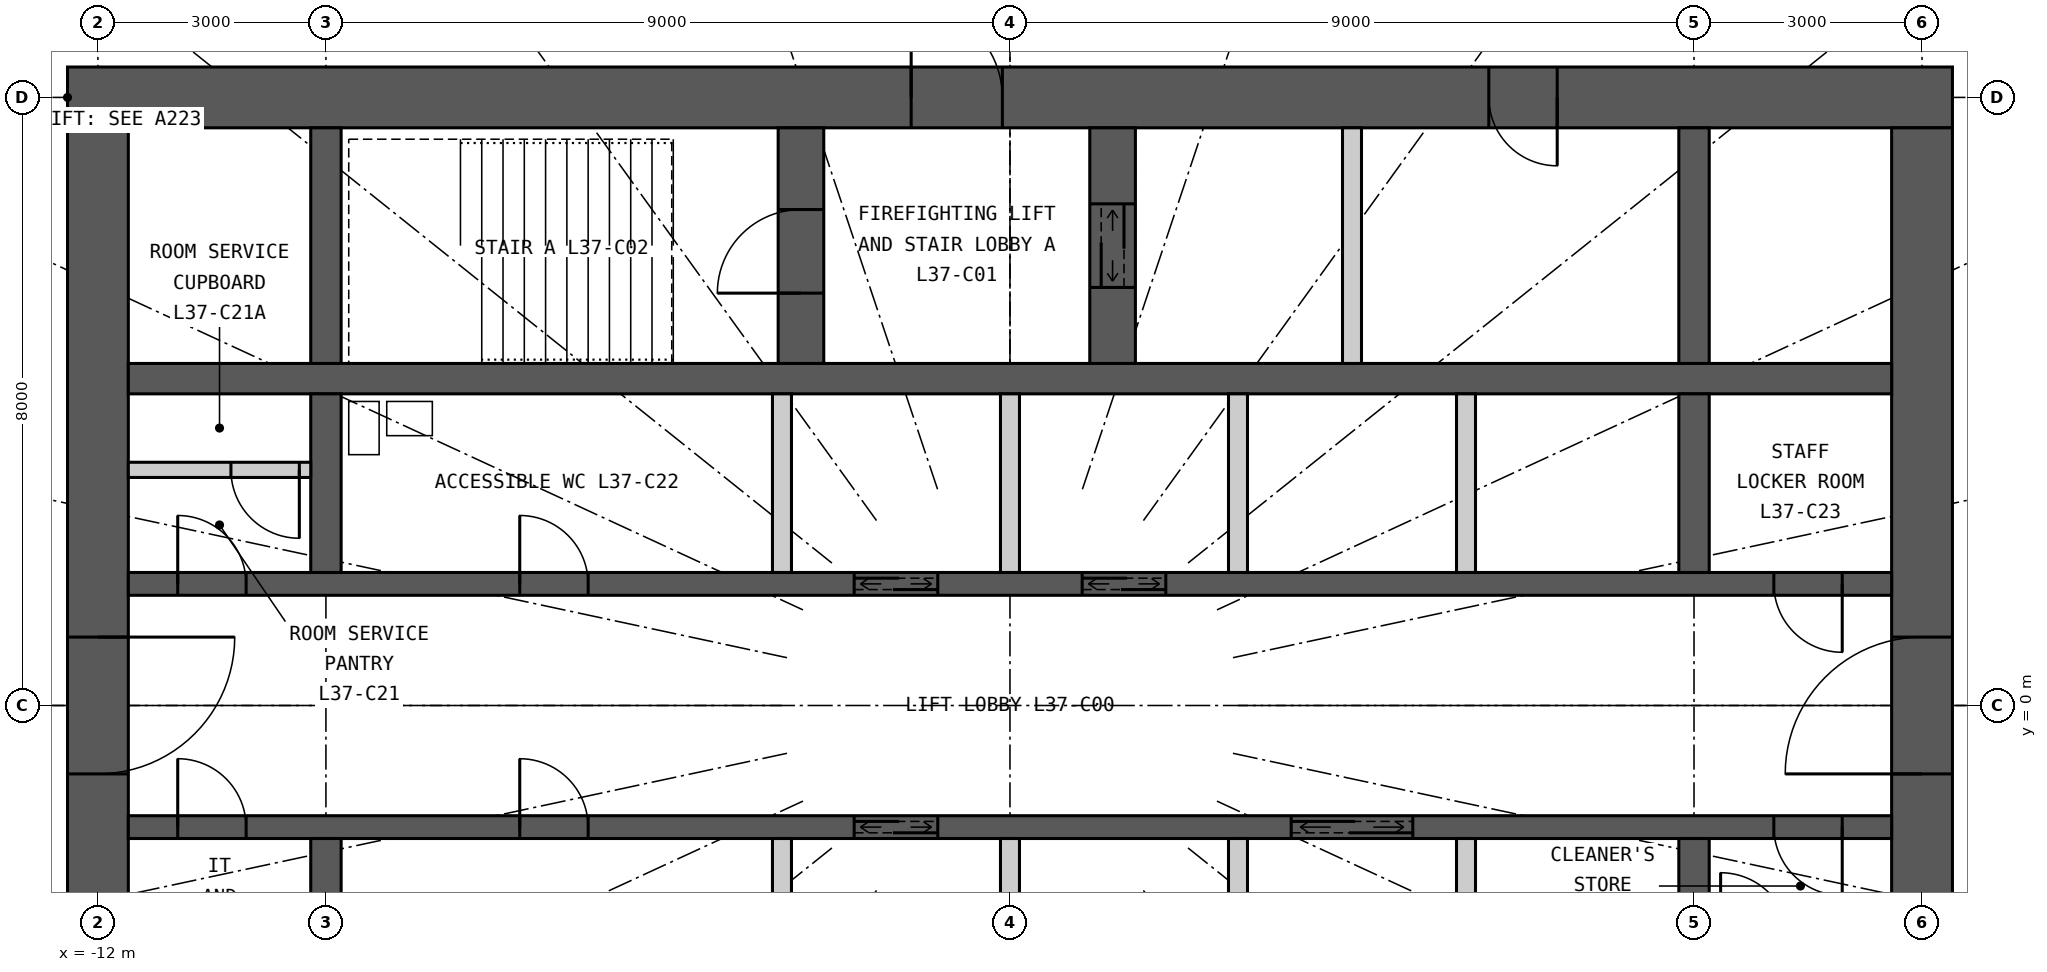
"""IFC4 building model, lengths in metres.
Left out: names, types, materials, properties, quantities, classifications, styles, units other than length and angle.
Written with IfcOpenShell. Run it as: python <this file> out.ifc"""

import sys

from ifc_helpers import new_model, si_unit, direction, frame, frame_2d, origin, place, context, subcontext, project, spatial, rectangle, extrude, element, fill, save


model = new_model("IFC4")
c1 = context("Model", 3, precision=1e-05, world=origin(), true_north=direction((0.0, 1.0)))
c2 = subcontext(c1, "Body", "Model", "MODEL_VIEW")
j1 = project(units=[si_unit("LENGTHUNIT", "METRE"), si_unit("PLANEANGLEUNIT", "RADIAN")], contexts=[c1])
p1 = place(None, origin())
s1 = spatial("IfcSite", under=j1, at=p1, CompositionType="ELEMENT")
p2 = place(p1, origin())
s2 = spatial("IfcBuilding", under=s1, at=p2, CompositionType="ELEMENT")
p3 = place(p2, frame((0.0, 0.0, 143.4)))
s3 = spatial("IfcBuildingStorey", under=s2, at=p3, CompositionType="ELEMENT", Elevation=143.4)
p4 = place(p3, frame((-12.4, 8.0, 0.0), z_axis=(0.0, 0.0, 1.0), x_axis=(1.0, 0.0, 0.0)))
e1 = element("IfcWall", 1, at=p4, inside=s3, PredefinedType="SHEAR", context=c2, shape_type="SweptSolid", body=[
    extrude(rectangle(XDim=24.8, YDim=0.8, at=frame_2d((12.4, 0.0))), origin(), (0.0, 0.0, 1.0), 3.3),
])
p5 = place(p4, frame((11.1, 0.0, 0.0)))
e2 = element("IfcOpeningElement", 2, at=p5, cuts=e1, PredefinedType="OPENING", context=c2, shape_type="SweptSolid", body=[
    extrude(rectangle(XDim=1.2, YDim=2.2, at=frame_2d((0.6, 1.1))), frame((0.0, 0.41, 0.0), z_axis=(0.0, -1.0, 0.0), x_axis=(1.0, 0.0, 0.0)), (0.0, 0.0, 1.0), 0.82),
])
p6 = place(p4, frame((18.7, 0.0, 0.0)))
e3 = element("IfcOpeningElement", 3, at=p6, cuts=e1, PredefinedType="OPENING", context=c2, shape_type="SweptSolid", body=[
    extrude(rectangle(XDim=0.9, YDim=2.2, at=frame_2d((0.45, 1.1))), frame((0.0, 0.41, 0.0), z_axis=(0.0, -1.0, 0.0), x_axis=(1.0, 0.0, 0.0)), (0.0, 0.0, 1.0), 0.82),
])
p7 = place(p3, frame((12.0, -7.6, 0.0), z_axis=(0.0, 0.0, 1.0), x_axis=(0.0, 1.0, 0.0)))
e4 = element("IfcWall", 4, at=p7, inside=s3, PredefinedType="SHEAR", context=c2, shape_type="SweptSolid", body=[
    extrude(rectangle(XDim=15.2, YDim=0.8, at=frame_2d((7.6, 0.0))), origin(), (0.0, 0.0, 1.0), 3.3),
])
p8 = place(p7, frame((6.7, 0.0, 0.0)))
e5 = element("IfcOpeningElement", 5, at=p8, cuts=e4, PredefinedType="OPENING", context=c2, shape_type="SweptSolid", body=[
    extrude(rectangle(XDim=1.8, YDim=2.2, at=frame_2d((0.9, 1.1))), frame((0.0, 0.41, 0.0), z_axis=(0.0, -1.0, 0.0), x_axis=(1.0, 0.0, 0.0)), (0.0, 0.0, 1.0), 0.82),
])
p9 = place(p3, frame((-12.0, 7.6, 0.0), z_axis=(0.0, 0.0, 1.0), x_axis=(0.0, -1.0, 0.0)))
e6 = element("IfcWall", 6, at=p9, inside=s3, PredefinedType="SHEAR", context=c2, shape_type="SweptSolid", body=[
    extrude(rectangle(XDim=15.2, YDim=0.8, at=frame_2d((7.6, 0.0))), origin(), (0.0, 0.0, 1.0), 3.3),
])
p10 = place(p9, frame((6.7, 0.0, 0.0)))
e7 = element("IfcOpeningElement", 7, at=p10, cuts=e6, PredefinedType="OPENING", context=c2, shape_type="SweptSolid", body=[
    extrude(rectangle(XDim=1.8, YDim=2.2, at=frame_2d((0.9, 1.1))), frame((0.0, 0.41, 0.0), z_axis=(0.0, -1.0, 0.0), x_axis=(1.0, 0.0, 0.0)), (0.0, 0.0, 1.0), 0.82),
])
p11 = place(p3, frame((-11.6, 4.3, 0.0), z_axis=(0.0, 0.0, 1.0), x_axis=(1.0, 0.0, 0.0)))
e8 = element("IfcWall", 8, at=p11, inside=s3, PredefinedType="SHEAR", context=c2, shape_type="SweptSolid", body=[
    extrude(rectangle(XDim=23.2, YDim=0.4, at=frame_2d((11.6, 0.0))), origin(), (0.0, 0.0, 1.0), 3.3),
])
p12 = place(p3, frame((-11.6, 1.6, 0.0), z_axis=(0.0, 0.0, 1.0), x_axis=(1.0, 0.0, 0.0)))
e9 = element("IfcWall", 9, at=p12, inside=s3, PredefinedType="SHEAR", context=c2, shape_type="SweptSolid", body=[
    extrude(rectangle(XDim=23.2, YDim=0.3, at=frame_2d((11.6, 0.0))), origin(), (0.0, 0.0, 1.0), 3.3),
])
p13 = place(p12, frame((9.55, 0.0, 0.0)))
e10 = element("IfcOpeningElement", 10, at=p13, cuts=e9, PredefinedType="OPENING", context=c2, shape_type="SweptSolid", body=[
    extrude(rectangle(XDim=1.1, YDim=2.2, at=frame_2d((0.55, 1.1))), frame((0.0, 0.16, 0.0), z_axis=(0.0, -1.0, 0.0), x_axis=(1.0, 0.0, 0.0)), (0.0, 0.0, 1.0), 0.32),
])
p14 = place(p12, frame((12.55, 0.0, 0.0)))
e11 = element("IfcOpeningElement", 11, at=p14, cuts=e9, PredefinedType="OPENING", context=c2, shape_type="SweptSolid", body=[
    extrude(rectangle(XDim=1.1, YDim=2.2, at=frame_2d((0.55, 1.1))), frame((0.0, 0.16, 0.0), z_axis=(0.0, -1.0, 0.0), x_axis=(1.0, 0.0, 0.0)), (0.0, 0.0, 1.0), 0.32),
])
p15 = place(p12, frame((0.65, 0.0, 0.0)))
e12 = element("IfcOpeningElement", 12, at=p15, cuts=e9, PredefinedType="OPENING", context=c2, shape_type="SweptSolid", body=[
    extrude(rectangle(XDim=0.9, YDim=2.2, at=frame_2d((0.45, 1.1))), frame((0.0, 0.16, 0.0), z_axis=(0.0, -1.0, 0.0), x_axis=(1.0, 0.0, 0.0)), (0.0, 0.0, 1.0), 0.32),
])
p16 = place(p12, frame((5.15, 0.0, 0.0)))
e13 = element("IfcOpeningElement", 13, at=p16, cuts=e9, PredefinedType="OPENING", context=c2, shape_type="SweptSolid", body=[
    extrude(rectangle(XDim=0.9, YDim=2.2, at=frame_2d((0.45, 1.1))), frame((0.0, 0.16, 0.0), z_axis=(0.0, -1.0, 0.0), x_axis=(1.0, 0.0, 0.0)), (0.0, 0.0, 1.0), 0.32),
])
p17 = place(p12, frame((21.65, 0.0, 0.0)))
e14 = element("IfcOpeningElement", 14, at=p17, cuts=e9, PredefinedType="OPENING", context=c2, shape_type="SweptSolid", body=[
    extrude(rectangle(XDim=0.9, YDim=2.2, at=frame_2d((0.45, 1.1))), frame((0.0, 0.16, 0.0), z_axis=(0.0, -1.0, 0.0), x_axis=(1.0, 0.0, 0.0)), (0.0, 0.0, 1.0), 0.32),
])
p18 = place(p3, frame((-11.6, -1.6, 0.0), z_axis=(0.0, 0.0, 1.0), x_axis=(1.0, 0.0, 0.0)))
e15 = element("IfcWall", 15, at=p18, inside=s3, PredefinedType="SHEAR", context=c2, shape_type="SweptSolid", body=[
    extrude(rectangle(XDim=23.2, YDim=0.3, at=frame_2d((11.6, 0.0))), origin(), (0.0, 0.0, 1.0), 3.3),
])
p19 = place(p18, frame((9.55, 0.0, 0.0)))
e16 = element("IfcOpeningElement", 16, at=p19, cuts=e15, PredefinedType="OPENING", context=c2, shape_type="SweptSolid", body=[
    extrude(rectangle(XDim=1.1, YDim=2.2, at=frame_2d((0.55, 1.1))), frame((0.0, 0.16, 0.0), z_axis=(0.0, -1.0, 0.0), x_axis=(1.0, 0.0, 0.0)), (0.0, 0.0, 1.0), 0.32),
])
p20 = place(p18, frame((15.3, 0.0, 0.0)))
e17 = element("IfcOpeningElement", 17, at=p20, cuts=e15, PredefinedType="OPENING", context=c2, shape_type="SweptSolid", body=[
    extrude(rectangle(XDim=1.6, YDim=2.4, at=frame_2d((0.8, 1.2))), frame((0.0, 0.16, 0.0), z_axis=(0.0, -1.0, 0.0), x_axis=(1.0, 0.0, 0.0)), (0.0, 0.0, 1.0), 0.32),
])
p21 = place(p18, frame((0.65, 0.0, 0.0)))
e18 = element("IfcOpeningElement", 18, at=p21, cuts=e15, PredefinedType="OPENING", context=c2, shape_type="SweptSolid", body=[
    extrude(rectangle(XDim=0.9, YDim=2.2, at=frame_2d((0.45, 1.1))), frame((0.0, 0.16, 0.0), z_axis=(0.0, -1.0, 0.0), x_axis=(1.0, 0.0, 0.0)), (0.0, 0.0, 1.0), 0.32),
])
p22 = place(p18, frame((5.15, 0.0, 0.0)))
e19 = element("IfcOpeningElement", 19, at=p22, cuts=e15, PredefinedType="OPENING", context=c2, shape_type="SweptSolid", body=[
    extrude(rectangle(XDim=0.9, YDim=2.2, at=frame_2d((0.45, 1.1))), frame((0.0, 0.16, 0.0), z_axis=(0.0, -1.0, 0.0), x_axis=(1.0, 0.0, 0.0)), (0.0, 0.0, 1.0), 0.32),
])
p23 = place(p18, frame((21.65, 0.0, 0.0)))
e20 = element("IfcOpeningElement", 20, at=p23, cuts=e15, PredefinedType="OPENING", context=c2, shape_type="SweptSolid", body=[
    extrude(rectangle(XDim=0.9, YDim=2.2, at=frame_2d((0.45, 1.1))), frame((0.0, 0.16, 0.0), z_axis=(0.0, -1.0, 0.0), x_axis=(1.0, 0.0, 0.0)), (0.0, 0.0, 1.0), 0.32),
])
p24 = place(p3, frame((-9.0, 4.5, 0.0), z_axis=(0.0, 0.0, 1.0), x_axis=(0.0, 1.0, 0.0)))
e21 = element("IfcWall", 21, at=p24, inside=s3, PredefinedType="SHEAR", context=c2, shape_type="SweptSolid", body=[
    extrude(rectangle(XDim=3.1, YDim=0.4, at=frame_2d((1.55, 0.0))), origin(), (0.0, 0.0, 1.0), 3.3),
])
for number, where, z_axis, x_axis in (
    (22, (-9.0, 1.75, 0.0), (0.0, 0.0, 1.0), (0.0, 1.0, 0.0)),
    (23, (-9.0, -4.1, 0.0), (0.0, 0.0, 1.0), (0.0, 1.0, 0.0)),
):
    element("IfcWall", number, at=place(p3, frame(where, z_axis=z_axis, x_axis=x_axis)), inside=s3, PredefinedType="SHEAR", context=c2, shape_type="SweptSolid", body=[
        extrude(rectangle(XDim=2.35, YDim=0.4, at=frame_2d((1.175, 0.0))), origin(), (0.0, 0.0, 1.0), 3.3),
    ])
p25 = place(p3, frame((9.0, 4.5, 0.0), z_axis=(0.0, 0.0, 1.0), x_axis=(0.0, 1.0, 0.0)))
e24 = element("IfcWall", 24, at=p25, inside=s3, PredefinedType="SHEAR", context=c2, shape_type="SweptSolid", body=[
    extrude(rectangle(XDim=3.1, YDim=0.4, at=frame_2d((1.55, 0.0))), origin(), (0.0, 0.0, 1.0), 3.3),
])
for number, where, z_axis, x_axis in (
    (25, (9.0, 1.75, 0.0), (0.0, 0.0, 1.0), (0.0, 1.0, 0.0)),
    (26, (9.0, -4.1, 0.0), (0.0, 0.0, 1.0), (0.0, 1.0, 0.0)),
):
    element("IfcWall", number, at=place(p3, frame(where, z_axis=z_axis, x_axis=x_axis)), inside=s3, PredefinedType="SHEAR", context=c2, shape_type="SweptSolid", body=[
        extrude(rectangle(XDim=2.35, YDim=0.4, at=frame_2d((1.175, 0.0))), origin(), (0.0, 0.0, 1.0), 3.3),
    ])
p26 = place(p3, frame((-2.75, 4.5, 0.0), z_axis=(0.0, 0.0, 1.0), x_axis=(0.0, 1.0, 0.0)))
e27 = element("IfcWall", 27, at=p26, inside=s3, PredefinedType="SHEAR", context=c2, shape_type="SweptSolid", body=[
    extrude(rectangle(XDim=3.1, YDim=0.6, at=frame_2d((1.55, 0.0))), origin(), (0.0, 0.0, 1.0), 3.3),
])
p27 = place(p26, frame((0.925, 0.0, 0.0)))
e28 = element("IfcOpeningElement", 28, at=p27, cuts=e27, PredefinedType="OPENING", context=c2, shape_type="SweptSolid", body=[
    extrude(rectangle(XDim=1.1, YDim=2.2, at=frame_2d((0.55, 1.1))), frame((0.0, 0.31, 0.0), z_axis=(0.0, -1.0, 0.0), x_axis=(1.0, 0.0, 0.0)), (0.0, 0.0, 1.0), 0.62),
])
p28 = place(p3, frame((1.35, 4.5, 0.0), z_axis=(0.0, 0.0, 1.0), x_axis=(0.0, 1.0, 0.0)))
e29 = element("IfcWall", 29, at=p28, inside=s3, PredefinedType="SHEAR", context=c2, shape_type="SweptSolid", body=[
    extrude(rectangle(XDim=3.1, YDim=0.6, at=frame_2d((1.55, 0.0))), origin(), (0.0, 0.0, 1.0), 3.3),
])
p29 = place(p28, frame((1.0, 0.0, 0.0)))
e30 = element("IfcOpeningElement", 30, at=p29, cuts=e29, PredefinedType="OPENING", context=c2, shape_type="SweptSolid", body=[
    extrude(rectangle(XDim=1.1, YDim=2.2, at=frame_2d((0.55, 1.1))), frame((0.0, 0.31, 0.0), z_axis=(0.0, -1.0, 0.0), x_axis=(1.0, 0.0, 0.0)), (0.0, 0.0, 1.0), 0.62),
])
p30 = place(p3, frame((4.5, 4.5, 0.0), z_axis=(0.0, 0.0, 1.0), x_axis=(0.0, 1.0, 0.0)))
e31 = element("IfcWall", 31, at=p30, inside=s3, PredefinedType="PARTITIONING", context=c2, shape_type="SweptSolid", body=[
    extrude(rectangle(XDim=3.1, YDim=0.25, at=frame_2d((1.55, 0.0))), origin(), (0.0, 0.0, 1.0), 3.3),
])
for number, where, z_axis, x_axis in (
    (32, (-3.0, 1.75, 0.0), (0.0, 0.0, 1.0), (0.0, 1.0, 0.0)),
    (33, (0.0, 1.75, 0.0), (0.0, 0.0, 1.0), (0.0, 1.0, 0.0)),
    (34, (3.0, 1.75, 0.0), (0.0, 0.0, 1.0), (0.0, 1.0, 0.0)),
    (35, (6.0, 1.75, 0.0), (0.0, 0.0, 1.0), (0.0, 1.0, 0.0)),
    (36, (-3.0, -4.1, 0.0), (0.0, 0.0, 1.0), (0.0, 1.0, 0.0)),
    (37, (0.0, -4.1, 0.0), (0.0, 0.0, 1.0), (0.0, 1.0, 0.0)),
    (38, (3.0, -4.1, 0.0), (0.0, 0.0, 1.0), (0.0, 1.0, 0.0)),
    (39, (6.0, -4.1, 0.0), (0.0, 0.0, 1.0), (0.0, 1.0, 0.0)),
):
    element("IfcWall", number, at=place(p3, frame(where, z_axis=z_axis, x_axis=x_axis)), inside=s3, PredefinedType="PARTITIONING", context=c2, shape_type="SweptSolid", body=[
        extrude(rectangle(XDim=2.35, YDim=0.25, at=frame_2d((1.175, 0.0))), origin(), (0.0, 0.0, 1.0), 3.3),
    ])
p31 = place(p3, frame((-11.6, 3.1, 0.0), z_axis=(0.0, 0.0, 1.0), x_axis=(1.0, 0.0, 0.0)))
e40 = element("IfcWall", 40, at=p31, inside=s3, PredefinedType="PARTITIONING", context=c2, shape_type="SweptSolid", body=[
    extrude(rectangle(XDim=2.4, YDim=0.2, at=frame_2d((1.2, 0.0))), origin(), (0.0, 0.0, 1.0), 3.12),
])
p32 = place(p31, frame((1.35, 0.0, 0.0)))
e41 = element("IfcOpeningElement", 41, at=p32, cuts=e40, PredefinedType="OPENING", context=c2, shape_type="SweptSolid", body=[
    extrude(rectangle(XDim=0.9, YDim=2.2, at=frame_2d((0.45, 1.1))), frame((0.0, 0.11, 0.0), z_axis=(0.0, -1.0, 0.0), x_axis=(1.0, 0.0, 0.0)), (0.0, 0.0, 1.0), 0.22),
])
p33 = place(p5, origin())
e42 = element("IfcDoor", 42, at=p33, inside=s3, OperationType="SINGLE_SWING_LEFT", PredefinedType="DOOR", context=c2, shape_type="SweptSolid", body=[
    extrude(rectangle(XDim=1.2, YDim=2.2, at=frame_2d((0.6, 1.1))), frame((0.0, 0.025, 0.0), z_axis=(0.0, -1.0, 0.0), x_axis=(1.0, 0.0, 0.0)), (0.0, 0.0, 1.0), 0.05),
])
fill(e2, e42)
p34 = place(p27, origin())
e43 = element("IfcDoor", 43, at=p34, inside=s3, OperationType="SINGLE_SWING_LEFT", PredefinedType="DOOR", context=c2, shape_type="SweptSolid", body=[
    extrude(rectangle(XDim=1.1, YDim=2.2, at=frame_2d((0.55, 1.1))), frame((0.0, 0.025, 0.0), z_axis=(0.0, -1.0, 0.0), x_axis=(1.0, 0.0, 0.0)), (0.0, 0.0, 1.0), 0.05),
])
fill(e28, e43)
p35 = place(p29, origin())
e44 = element("IfcDoor", 44, at=p35, inside=s3, OperationType="DOUBLE_DOOR_SLIDING", PredefinedType="DOOR", context=c2, shape_type="SweptSolid", body=[
    extrude(rectangle(XDim=1.1, YDim=2.2, at=frame_2d((0.55, 1.1))), frame((0.0, 0.025, 0.0), z_axis=(0.0, -1.0, 0.0), x_axis=(1.0, 0.0, 0.0)), (0.0, 0.0, 1.0), 0.05),
])
fill(e30, e44)
p36 = place(p6, origin())
e45 = element("IfcDoor", 45, at=p36, inside=s3, OperationType="SINGLE_SWING_RIGHT", PredefinedType="DOOR", context=c2, shape_type="SweptSolid", body=[
    extrude(rectangle(XDim=0.9, YDim=2.2, at=frame_2d((0.45, 1.1))), frame((0.0, 0.025, 0.0), z_axis=(0.0, -1.0, 0.0), x_axis=(1.0, 0.0, 0.0)), (0.0, 0.0, 1.0), 0.05),
])
fill(e3, e45)
p37 = place(p13, origin())
e46 = element("IfcDoor", 46, at=p37, inside=s3, OperationType="DOUBLE_DOOR_SLIDING", PredefinedType="DOOR", context=c2, shape_type="SweptSolid", body=[
    extrude(rectangle(XDim=1.1, YDim=2.2, at=frame_2d((0.55, 1.1))), frame((0.0, 0.025, 0.0), z_axis=(0.0, -1.0, 0.0), x_axis=(1.0, 0.0, 0.0)), (0.0, 0.0, 1.0), 0.05),
])
fill(e10, e46)
p38 = place(p14, origin())
e47 = element("IfcDoor", 47, at=p38, inside=s3, OperationType="DOUBLE_DOOR_SLIDING", PredefinedType="DOOR", context=c2, shape_type="SweptSolid", body=[
    extrude(rectangle(XDim=1.1, YDim=2.2, at=frame_2d((0.55, 1.1))), frame((0.0, 0.025, 0.0), z_axis=(0.0, -1.0, 0.0), x_axis=(1.0, 0.0, 0.0)), (0.0, 0.0, 1.0), 0.05),
])
fill(e11, e47)
p39 = place(p19, origin())
e48 = element("IfcDoor", 48, at=p39, inside=s3, OperationType="DOUBLE_DOOR_SLIDING", PredefinedType="DOOR", context=c2, shape_type="SweptSolid", body=[
    extrude(rectangle(XDim=1.1, YDim=2.2, at=frame_2d((0.55, 1.1))), frame((0.0, 0.025, 0.0), z_axis=(0.0, -1.0, 0.0), x_axis=(1.0, 0.0, 0.0)), (0.0, 0.0, 1.0), 0.05),
])
fill(e16, e48)
p40 = place(p20, origin())
e49 = element("IfcDoor", 49, at=p40, inside=s3, OperationType="DOUBLE_DOOR_SLIDING", PredefinedType="DOOR", context=c2, shape_type="SweptSolid", body=[
    extrude(rectangle(XDim=1.6, YDim=2.4, at=frame_2d((0.8, 1.2))), frame((0.0, 0.025, 0.0), z_axis=(0.0, -1.0, 0.0), x_axis=(1.0, 0.0, 0.0)), (0.0, 0.0, 1.0), 0.05),
])
fill(e17, e49)
p41 = place(p32, origin())
e50 = element("IfcDoor", 50, at=p41, inside=s3, OperationType="SINGLE_SWING_RIGHT", PredefinedType="DOOR", context=c2, shape_type="SweptSolid", body=[
    extrude(rectangle(XDim=0.9, YDim=2.2, at=frame_2d((0.45, 1.1))), frame((0.0, 0.025, 0.0), z_axis=(0.0, -1.0, 0.0), x_axis=(1.0, 0.0, 0.0)), (0.0, 0.0, 1.0), 0.05),
])
fill(e41, e50)
p42 = place(p15, origin())
e51 = element("IfcDoor", 51, at=p42, inside=s3, OperationType="SINGLE_SWING_LEFT", PredefinedType="DOOR", context=c2, shape_type="SweptSolid", body=[
    extrude(rectangle(XDim=0.9, YDim=2.2, at=frame_2d((0.45, 1.1))), frame((0.0, 0.025, 0.0), z_axis=(0.0, -1.0, 0.0), x_axis=(1.0, 0.0, 0.0)), (0.0, 0.0, 1.0), 0.05),
])
fill(e12, e51)
p43 = place(p16, origin())
e52 = element("IfcDoor", 52, at=p43, inside=s3, OperationType="SINGLE_SWING_LEFT", PredefinedType="DOOR", context=c2, shape_type="SweptSolid", body=[
    extrude(rectangle(XDim=0.9, YDim=2.2, at=frame_2d((0.45, 1.1))), frame((0.0, 0.025, 0.0), z_axis=(0.0, -1.0, 0.0), x_axis=(1.0, 0.0, 0.0)), (0.0, 0.0, 1.0), 0.05),
])
fill(e13, e52)
p44 = place(p17, origin())
e53 = element("IfcDoor", 53, at=p44, inside=s3, OperationType="SINGLE_SWING_RIGHT", PredefinedType="DOOR", context=c2, shape_type="SweptSolid", body=[
    extrude(rectangle(XDim=0.9, YDim=2.2, at=frame_2d((0.45, 1.1))), frame((0.0, 0.025, 0.0), z_axis=(0.0, -1.0, 0.0), x_axis=(1.0, 0.0, 0.0)), (0.0, 0.0, 1.0), 0.05),
])
fill(e14, e53)
p45 = place(p21, origin())
e54 = element("IfcDoor", 54, at=p45, inside=s3, OperationType="SINGLE_SWING_LEFT", PredefinedType="DOOR", context=c2, shape_type="SweptSolid", body=[
    extrude(rectangle(XDim=0.9, YDim=2.2, at=frame_2d((0.45, 1.1))), frame((0.0, 0.025, 0.0), z_axis=(0.0, -1.0, 0.0), x_axis=(1.0, 0.0, 0.0)), (0.0, 0.0, 1.0), 0.05),
])
fill(e18, e54)
p46 = place(p22, origin())
e55 = element("IfcDoor", 55, at=p46, inside=s3, OperationType="SINGLE_SWING_LEFT", PredefinedType="DOOR", context=c2, shape_type="SweptSolid", body=[
    extrude(rectangle(XDim=0.9, YDim=2.2, at=frame_2d((0.45, 1.1))), frame((0.0, 0.025, 0.0), z_axis=(0.0, -1.0, 0.0), x_axis=(1.0, 0.0, 0.0)), (0.0, 0.0, 1.0), 0.05),
])
fill(e19, e55)
p47 = place(p23, origin())
e56 = element("IfcDoor", 56, at=p47, inside=s3, OperationType="SINGLE_SWING_RIGHT", PredefinedType="DOOR", context=c2, shape_type="SweptSolid", body=[
    extrude(rectangle(XDim=0.9, YDim=2.2, at=frame_2d((0.45, 1.1))), frame((0.0, 0.025, 0.0), z_axis=(0.0, -1.0, 0.0), x_axis=(1.0, 0.0, 0.0)), (0.0, 0.0, 1.0), 0.05),
])
fill(e20, e56)
p48 = place(p8, origin())
e57 = element("IfcDoor", 57, at=p48, inside=s3, OperationType="DOUBLE_DOOR_DOUBLE_SWING", PredefinedType="DOOR", context=c2, shape_type="SweptSolid", body=[
    extrude(rectangle(XDim=1.8, YDim=2.2, at=frame_2d((0.9, 1.1))), frame((0.0, 0.025, 0.0), z_axis=(0.0, -1.0, 0.0), x_axis=(1.0, 0.0, 0.0)), (0.0, 0.0, 1.0), 0.05),
])
fill(e5, e57)
p49 = place(p10, origin())
e58 = element("IfcDoor", 58, at=p49, inside=s3, OperationType="DOUBLE_DOOR_DOUBLE_SWING", PredefinedType="DOOR", context=c2, shape_type="SweptSolid", body=[
    extrude(rectangle(XDim=1.8, YDim=2.2, at=frame_2d((0.9, 1.1))), frame((0.0, 0.025, 0.0), z_axis=(0.0, -1.0, 0.0), x_axis=(1.0, 0.0, 0.0)), (0.0, 0.0, 1.0), 0.05),
])
fill(e7, e58)
save(model, sys.argv[1])
